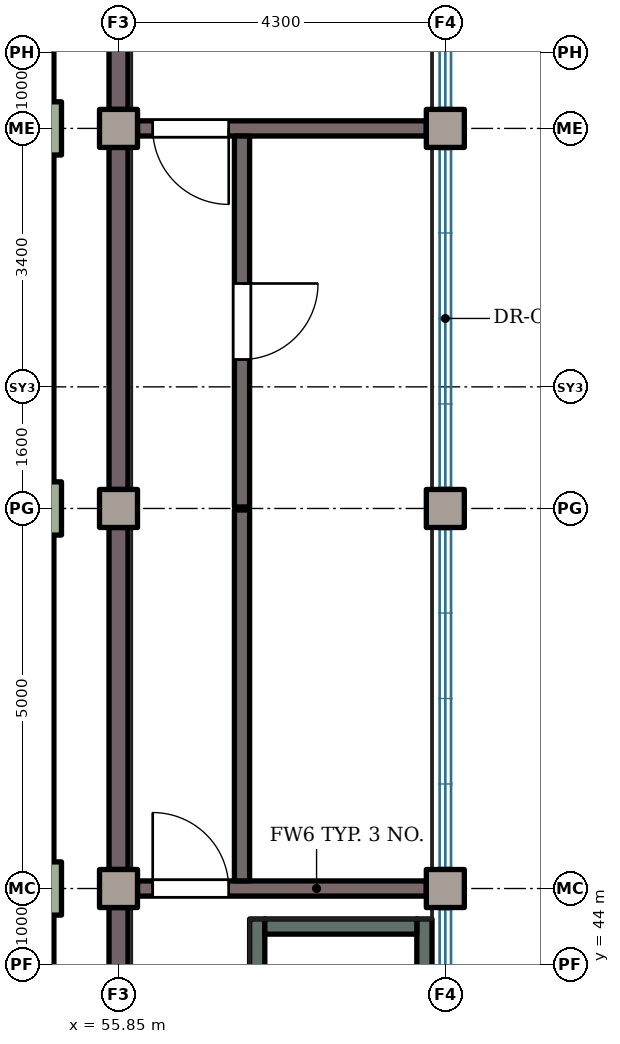
"""IFC4 building model, lengths in metres.
Left out: names, types, materials, properties, quantities, classifications, styles, units other than length and angle.
Written with IfcOpenShell. Run it as: python <this file> out.ifc"""

import sys

from ifc_helpers import new_model, si_unit, direction, frame, frame_2d, origin, origin_2d, place, context, subcontext, project, spatial, rectangle, extrude, element, fill, save


model = new_model("IFC4")
c1 = context("Model", 3, precision=1e-05, world=origin(), true_north=direction((0.0, 1.0)))
c2 = subcontext(c1, "Body", "Model", "MODEL_VIEW")
j1 = project(units=[si_unit("LENGTHUNIT", "METRE"), si_unit("PLANEANGLEUNIT", "RADIAN")], contexts=[c1])
p1 = place(None, origin())
s1 = spatial("IfcSite", under=j1, at=p1, CompositionType="ELEMENT")
p2 = place(p1, origin())
s2 = spatial("IfcBuilding", under=s1, at=p2, CompositionType="ELEMENT")
p3 = place(p2, frame((0.0, 0.0, 4.2)))
s3 = spatial("IfcBuildingStorey", under=s2, at=p3, CompositionType="ELEMENT", Elevation=4.2)
for number, where, z_axis, x_axis in (
    (1, (54.75, 45.0, 0.0), (0.0, 0.0, 1.0), (1.0, 0.0, 0.0)),
    (2, (54.75, 50.0, 0.0), (0.0, 0.0, 1.0), (1.0, 0.0, 0.0)),
    (3, (54.75, 55.0, 0.0), (0.0, 0.0, 1.0), (1.0, 0.0, 0.0)),
):
    element("IfcColumn", number, at=place(p3, frame(where, z_axis=z_axis, x_axis=x_axis)), inside=s3, PredefinedType="COLUMN", context=c2, shape_type="SweptSolid", body=[
        extrude(rectangle(XDim=0.7, YDim=0.7, at=origin_2d()), origin(), (0.0, 0.0, 1.0), 4.2),
    ])
for number, where, z_axis, x_axis in (
    (4, (54.75, 40.351, 0.0), (0.0, 0.0, 1.0), (0.0, 1.0, 0.0)),
    (5, (54.75, 45.351, 0.0), (0.0, 0.0, 1.0), (0.0, 1.0, 0.0)),
    (6, (54.75, 50.351, 0.0), (0.0, 0.0, 1.0), (0.0, 1.0, 0.0)),
    (7, (54.75, 55.351, 0.0), (0.0, 0.0, 1.0), (0.0, 1.0, 0.0)),
):
    element("IfcWall", number, at=place(p3, frame(where, z_axis=z_axis, x_axis=x_axis)), inside=s3, PredefinedType="SHEAR", context=c2, shape_type="SweptSolid", body=[
        extrude(rectangle(XDim=4.299, YDim=0.5, at=frame_2d((2.149, 0.0))), origin(), (0.0, 0.0, 1.0), 3.4),
    ])
for number, where, z_axis, x_axis in (
    (8, (55.85, 45.0, 0.0), (0.0, 0.0, 1.0), (1.0, 0.0, 0.0)),
    (9, (55.85, 50.0, 0.0), (0.0, 0.0, 1.0), (1.0, 0.0, 0.0)),
    (10, (55.85, 55.0, 0.0), (0.0, 0.0, 1.0), (1.0, 0.0, 0.0)),
    (11, (60.15, 45.0, 0.0), (0.0, 0.0, 1.0), (1.0, 0.0, 0.0)),
    (12, (60.15, 50.0, 0.0), (0.0, 0.0, 1.0), (1.0, 0.0, 0.0)),
    (13, (60.15, 55.0, 0.0), (0.0, 0.0, 1.0), (1.0, 0.0, 0.0)),
):
    element("IfcColumn", number, at=place(p3, frame(where, z_axis=z_axis, x_axis=x_axis)), inside=s3, PredefinedType="COLUMN", context=c2, shape_type="SweptSolid", body=[
        extrude(rectangle(XDim=0.5, YDim=0.5, at=origin_2d()), origin(), (0.0, 0.0, 1.0), 4.2),
    ])
for number, where, z_axis, x_axis in (
    (14, (55.85, 40.25, 0.0), (0.0, 0.0, 1.0), (0.0, 1.0, 0.0)),
    (15, (55.85, 45.25, 0.0), (0.0, 0.0, 1.0), (0.0, 1.0, 0.0)),
    (16, (55.85, 50.25, 0.0), (0.0, 0.0, 1.0), (0.0, 1.0, 0.0)),
    (17, (55.85, 55.25, 0.0), (0.0, 0.0, 1.0), (0.0, 1.0, 0.0)),
):
    element("IfcWall", number, at=place(p3, frame(where, z_axis=z_axis, x_axis=x_axis)), inside=s3, PredefinedType="SHEAR", context=c2, shape_type="SweptSolid", body=[
        extrude(rectangle(XDim=4.499, YDim=0.25, at=frame_2d((2.25, 0.0))), origin(), (0.0, 0.0, 1.0), 3.6),
    ])
p4 = place(p3, frame((56.1, 45.0, 0.0), z_axis=(0.0, 0.0, 1.0), x_axis=(1.0, 0.0, 0.0)))
e18 = element("IfcWall", 18, at=p4, inside=s3, PredefinedType="STANDARD", context=c2, shape_type="SweptSolid", body=[
    extrude(rectangle(XDim=3.8, YDim=0.2, at=frame_2d((1.9, 0.0))), origin(), (0.0, 0.0, 1.0), 3.95),
])
p5 = place(p4, frame((0.2, 0.0, 0.0)))
e19 = element("IfcOpeningElement", 19, at=p5, cuts=e18, PredefinedType="OPENING", context=c2, shape_type="SweptSolid", body=[
    extrude(rectangle(XDim=1.0, YDim=2.1, at=frame_2d((0.5, 1.05))), frame((0.0, 0.11, 0.0), z_axis=(0.0, -1.0, 0.0), x_axis=(1.0, 0.0, 0.0)), (0.0, 0.0, 1.0), 0.22),
])
p6 = place(p3, frame((56.1, 55.0, 0.0), z_axis=(0.0, 0.0, 1.0), x_axis=(1.0, 0.0, 0.0)))
e20 = element("IfcWall", 20, at=p6, inside=s3, PredefinedType="STANDARD", context=c2, shape_type="SweptSolid", body=[
    extrude(rectangle(XDim=3.8, YDim=0.2, at=frame_2d((1.9, 0.0))), origin(), (0.0, 0.0, 1.0), 3.95),
])
p7 = place(p6, frame((0.2, 0.0, 0.0)))
e21 = element("IfcOpeningElement", 21, at=p7, cuts=e20, PredefinedType="OPENING", context=c2, shape_type="SweptSolid", body=[
    extrude(rectangle(XDim=1.0, YDim=2.1, at=frame_2d((0.5, 1.05))), frame((0.0, 0.11, 0.0), z_axis=(0.0, -1.0, 0.0), x_axis=(1.0, 0.0, 0.0)), (0.0, 0.0, 1.0), 0.22),
])
p8 = place(p3, frame((57.475, 45.101, 0.0), z_axis=(0.0, 0.0, 1.0), x_axis=(0.0, 1.0, 0.0)))
e22 = element("IfcWall", 22, at=p8, inside=s3, PredefinedType="PARTITIONING", context=c2, shape_type="SweptSolid", body=[
    extrude(rectangle(XDim=4.879, YDim=0.2, at=frame_2d((2.44, 0.0))), origin(), (0.0, 0.0, 1.0), 3.95),
])
p9 = place(p3, frame((57.475, 50.02, 0.0), z_axis=(0.0, 0.0, 1.0), x_axis=(0.0, 1.0, 0.0)))
e23 = element("IfcWall", 23, at=p9, inside=s3, PredefinedType="PARTITIONING", context=c2, shape_type="SweptSolid", body=[
    extrude(rectangle(XDim=4.879, YDim=0.2, at=frame_2d((2.44, 0.0))), origin(), (0.0, 0.0, 1.0), 3.95),
])
p10 = place(p9, frame((1.94, 0.0, 0.0)))
e24 = element("IfcOpeningElement", 24, at=p10, cuts=e23, PredefinedType="OPENING", context=c2, shape_type="SweptSolid", body=[
    extrude(rectangle(XDim=1.0, YDim=2.1, at=frame_2d((0.5, 1.05))), frame((0.0, 0.11, 0.0), z_axis=(0.0, -1.0, 0.0), x_axis=(1.0, 0.0, 0.0)), (0.0, 0.0, 1.0), 0.22),
])
p11 = place(p3, frame((57.675, 42.2, 0.0), z_axis=(0.0, 0.0, 1.0), x_axis=(0.0, 1.0, 0.0)))
e25 = element("IfcWall", 25, at=p11, inside=s3, PredefinedType="SHEAR", context=c2, shape_type="SweptSolid", body=[
    extrude(rectangle(XDim=2.4, YDim=0.2, at=frame_2d((1.2, 0.0))), origin(), (0.0, 0.0, 1.0), 4.2),
])
p12 = place(p11, frame((0.7, 0.0, 0.0)))
e26 = element("IfcOpeningElement", 26, at=p12, cuts=e25, PredefinedType="OPENING", context=c2, shape_type="SweptSolid", body=[
    extrude(rectangle(XDim=1.0, YDim=2.1, at=frame_2d((0.5, 1.05))), frame((0.0, 0.11, 0.0), z_axis=(0.0, -1.0, 0.0), x_axis=(1.0, 0.0, 0.0)), (0.0, 0.0, 1.0), 0.22),
])
p13 = place(p3, frame((59.875, 42.2, 0.0), z_axis=(0.0, 0.0, 1.0), x_axis=(0.0, 1.0, 0.0)))
e27 = element("IfcWall", 27, at=p13, inside=s3, PredefinedType="SHEAR", context=c2, shape_type="SweptSolid", body=[
    extrude(rectangle(XDim=2.4, YDim=0.2, at=frame_2d((1.2, 0.0))), origin(), (0.0, 0.0, 1.0), 4.2),
])
p14 = place(p3, frame((57.775, 44.5, 0.0), z_axis=(0.0, 0.0, 1.0), x_axis=(1.0, 0.0, 0.0)))
e28 = element("IfcWall", 28, at=p14, inside=s3, PredefinedType="SHEAR", context=c2, shape_type="SweptSolid", body=[
    extrude(rectangle(XDim=2.0, YDim=0.2, at=frame_2d((1.0, 0.0))), origin(), (0.0, 0.0, 1.0), 4.2),
])
p15 = place(p5, origin())
e29 = element("IfcDoor", 29, at=p15, inside=s3, OperationType="SINGLE_SWING_LEFT", PredefinedType="DOOR", context=c2, shape_type="SweptSolid", body=[
    extrude(rectangle(XDim=1.0, YDim=2.1, at=frame_2d((0.5, 1.05))), frame((0.0, 0.025, 0.0), z_axis=(0.0, -1.0, 0.0), x_axis=(1.0, 0.0, 0.0)), (0.0, 0.0, 1.0), 0.05),
])
fill(e19, e29)
p16 = place(p7, origin())
e30 = element("IfcDoor", 30, at=p16, inside=s3, OperationType="SINGLE_SWING_RIGHT", PredefinedType="DOOR", context=c2, shape_type="SweptSolid", body=[
    extrude(rectangle(XDim=1.0, YDim=2.1, at=frame_2d((0.5, 1.05))), frame((0.0, 0.025, 0.0), z_axis=(0.0, -1.0, 0.0), x_axis=(1.0, 0.0, 0.0)), (0.0, 0.0, 1.0), 0.05),
])
fill(e21, e30)
p17 = place(p10, origin())
e31 = element("IfcDoor", 31, at=p17, inside=s3, OperationType="SINGLE_SWING_RIGHT", PredefinedType="DOOR", context=c2, shape_type="SweptSolid", body=[
    extrude(rectangle(XDim=1.0, YDim=2.1, at=frame_2d((0.5, 1.05))), frame((0.0, 0.025, 0.0), z_axis=(0.0, -1.0, 0.0), x_axis=(1.0, 0.0, 0.0)), (0.0, 0.0, 1.0), 0.05),
])
fill(e24, e31)
save(model, sys.argv[1])
